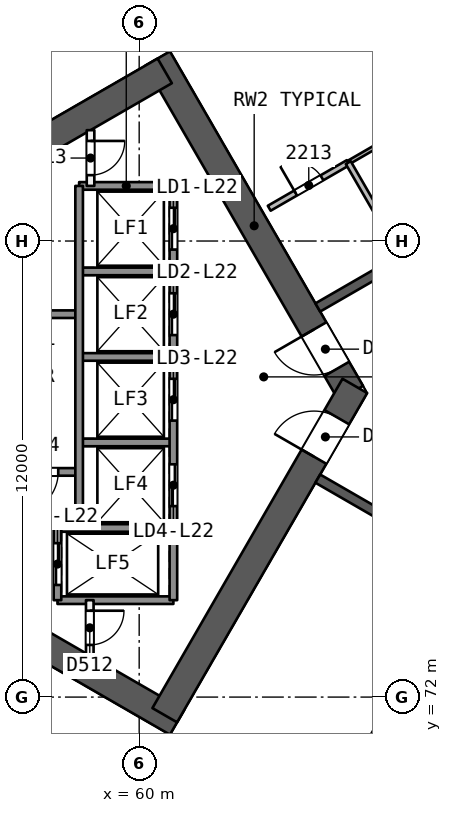
"""IFC4 building model, lengths in metres.
Left out: names, types, materials, properties, quantities, classifications, styles, units other than length and angle.
Written with IfcOpenShell. Run it as: python <this file> out.ifc"""

import sys

from ifc_helpers import new_model, si_unit, direction, frame, frame_2d, origin, place, context, subcontext, project, spatial, rectangle, extrude, element, fill, save


model = new_model("IFC4")
c1 = context("Model", 3, precision=1e-05, world=origin(), true_north=direction((0.0, 1.0)))
c2 = subcontext(c1, "Body", "Model", "MODEL_VIEW")
j1 = project(units=[si_unit("LENGTHUNIT", "METRE"), si_unit("PLANEANGLEUNIT", "RADIAN")], contexts=[c1])
p1 = place(None, origin())
s1 = spatial("IfcSite", under=j1, at=p1, CompositionType="ELEMENT")
p2 = place(p1, origin())
s2 = spatial("IfcBuilding", under=s1, at=p2, CompositionType="ELEMENT")
p3 = place(p2, frame((0.0, 0.0, 94.3)))
s3 = spatial("IfcBuildingStorey", under=s2, at=p3, CompositionType="ELEMENT", Elevation=94.3)
p4 = place(p3, frame((65.567, 80.0, 0.0), z_axis=(0.0, 0.0, 1.0), x_axis=(-0.499988615364, 0.866031976607, 0.0)))
e1 = element("IfcWall", 1, at=p4, inside=s3, PredefinedType="SHEAR", context=c2, shape_type="SweptSolid", body=[
    extrude(rectangle(XDim=10.163, YDim=0.75, at=frame_2d((5.082, 0.0))), origin(), (0.0, 0.0, 1.0), 3.7),
])
p5 = place(p4, frame((0.733, 0.0, 0.0)))
e2 = element("IfcOpeningElement", 2, at=p5, cuts=e1, PredefinedType="OPENING", context=c2, shape_type="SweptSolid", body=[
    extrude(rectangle(XDim=1.2, YDim=2.1, at=frame_2d((0.6, 1.05))), frame((0.0, 0.385, 0.0), z_axis=(0.0, -1.0, 0.0), x_axis=(1.0, 0.0, 0.0)), (0.0, 0.0, 1.0), 0.771),
])
p6 = place(p3, frame((60.673, 88.477, 0.0), z_axis=(0.0, 0.0, 1.0), x_axis=(-0.8660248072, -0.500001033313, 0.0)))
e3 = element("IfcWall", 3, at=p6, inside=s3, PredefinedType="SHEAR", context=c2, shape_type="SweptSolid", body=[
    extrude(rectangle(XDim=13.958, YDim=0.75, at=frame_2d((6.979, 0.0))), origin(), (0.0, 0.0, 1.0), 3.7),
])
p7 = place(p3, frame((48.772, 78.394, 0.0), z_axis=(0.0, 0.0, 1.0), x_axis=(0.866028339916, -0.499994914436, 0.0)))
e4 = element("IfcWall", 4, at=p7, inside=s3, PredefinedType="SHEAR", context=c2, shape_type="SweptSolid", body=[
    extrude(rectangle(XDim=14.117, YDim=0.75, at=frame_2d((7.059, 0.0))), origin(), (0.0, 0.0, 1.0), 3.7),
])
p8 = place(p3, frame((60.673, 71.523, 0.0), z_axis=(0.0, 0.0, 1.0), x_axis=(0.499997052475, 0.866027105532, 0.0)))
e5 = element("IfcWall", 5, at=p8, inside=s3, PredefinedType="SHEAR", context=c2, shape_type="SweptSolid", body=[
    extrude(rectangle(XDim=10.005, YDim=0.75, at=frame_2d((5.002, 0.0))), origin(), (0.0, 0.0, 1.0), 3.7),
])
p9 = place(p8, frame((7.855, 0.0, 0.0)))
e6 = element("IfcOpeningElement", 6, at=p9, cuts=e5, PredefinedType="OPENING", context=c2, shape_type="SweptSolid", body=[
    extrude(rectangle(XDim=1.2, YDim=2.1, at=frame_2d((0.6, 1.05))), frame((0.0, 0.385, 0.0), z_axis=(0.0, -1.0, 0.0), x_axis=(1.0, 0.0, 0.0)), (0.0, 0.0, 1.0), 0.771),
])
p10 = place(p3, frame((78.2, 90.046, 0.0), z_axis=(0.0, 0.0, 1.0), x_axis=(-0.866026492143, -0.499998114903, 0.0)))
e7 = element("IfcWall", 7, at=p10, inside=s3, PredefinedType="SHEAR", context=c2, shape_type="SweptSolid", body=[
    extrude(rectangle(XDim=15.588, YDim=0.25, at=frame_2d((7.794, 0.0))), origin(), (0.0, 0.0, 1.0), 3.25),
])
p11 = place(p10, frame((4.718, 0.0, 0.0)))
e8 = element("IfcOpeningElement", 8, at=p11, cuts=e7, PredefinedType="OPENING", context=c2, shape_type="SweptSolid", body=[
    extrude(rectangle(XDim=1.0, YDim=2.1, at=frame_2d((0.5, 1.05))), frame((0.0, 0.135, 0.0), z_axis=(0.0, -1.0, 0.0), x_axis=(1.0, 0.0, 0.0)), (0.0, 0.0, 1.0), 0.271),
])
p12 = place(p10, frame((7.194, 0.0, 0.0)))
e9 = element("IfcOpeningElement", 9, at=p12, cuts=e7, PredefinedType="OPENING", context=c2, shape_type="SweptSolid", body=[
    extrude(rectangle(XDim=1.2, YDim=2.4, at=frame_2d((0.6, 1.2))), frame((0.0, 0.135, 0.0), z_axis=(0.0, -1.0, 0.0), x_axis=(1.0, 0.0, 0.0)), (0.0, 0.0, 1.0), 0.271),
])
p13 = place(p10, frame((9.871, 0.0, 0.0)))
e10 = element("IfcOpeningElement", 10, at=p13, cuts=e7, PredefinedType="OPENING", context=c2, shape_type="SweptSolid", body=[
    extrude(rectangle(XDim=1.0, YDim=2.1, at=frame_2d((0.5, 1.05))), frame((0.0, 0.135, 0.0), z_axis=(0.0, -1.0, 0.0), x_axis=(1.0, 0.0, 0.0)), (0.0, 0.0, 1.0), 0.271),
])
p14 = place(p3, frame((64.7, 77.748, 0.0), z_axis=(0.0, 0.0, 1.0), x_axis=(0.866026492143, -0.499998114903, 0.0)))
e11 = element("IfcWall", 11, at=p14, inside=s3, PredefinedType="SHEAR", context=c2, shape_type="SweptSolid", body=[
    extrude(rectangle(XDim=15.588, YDim=0.25, at=frame_2d((7.794, 0.0))), origin(), (0.0, 0.0, 1.0), 3.25),
])
p15 = place(p14, frame((1.738, 0.0, 0.0)))
e12 = element("IfcOpeningElement", 12, at=p15, cuts=e11, PredefinedType="OPENING", context=c2, shape_type="SweptSolid", body=[
    extrude(rectangle(XDim=1.2, YDim=2.4, at=frame_2d((0.6, 1.2))), frame((0.0, 0.135, 0.0), z_axis=(0.0, -1.0, 0.0), x_axis=(1.0, 0.0, 0.0)), (0.0, 0.0, 1.0), 0.271),
])
p16 = place(p14, frame((5.785, 0.0, 0.0)))
e13 = element("IfcOpeningElement", 13, at=p16, cuts=e11, PredefinedType="OPENING", context=c2, shape_type="SweptSolid", body=[
    extrude(rectangle(XDim=0.9, YDim=2.1, at=frame_2d((0.45, 1.05))), frame((0.0, 0.135, 0.0), z_axis=(0.0, -1.0, 0.0), x_axis=(1.0, 0.0, 0.0)), (0.0, 0.0, 1.0), 0.271),
])
p17 = place(p14, frame((8.903, 0.0, 0.0)))
e14 = element("IfcOpeningElement", 14, at=p17, cuts=e11, PredefinedType="OPENING", context=c2, shape_type="SweptSolid", body=[
    extrude(rectangle(XDim=0.9, YDim=2.1, at=frame_2d((0.45, 1.05))), frame((0.0, 0.135, 0.0), z_axis=(0.0, -1.0, 0.0), x_axis=(1.0, 0.0, 0.0)), (0.0, 0.0, 1.0), 0.271),
])
p18 = place(p14, frame((12.75, 0.0, 0.0)))
e15 = element("IfcOpeningElement", 15, at=p18, cuts=e11, PredefinedType="OPENING", context=c2, shape_type="SweptSolid", body=[
    extrude(rectangle(XDim=1.0, YDim=2.1, at=frame_2d((0.5, 1.05))), frame((0.0, 0.135, 0.0), z_axis=(0.0, -1.0, 0.0), x_axis=(1.0, 0.0, 0.0)), (0.0, 0.0, 1.0), 0.271),
])
p19 = place(p3, frame((63.624, 96.587, 0.0), z_axis=(0.0, 0.0, 1.0), x_axis=(0.500006886881, -0.866021427605, 0.0)))
e16 = element("IfcWall", 16, at=p19, inside=s3, PredefinedType="PARTITIONING", context=c2, shape_type="SweptSolid", body=[
    extrude(rectangle(XDim=12.953, YDim=0.2, at=frame_2d((6.477, 0.0))), origin(), (0.0, 0.0, 1.0), 3.25),
])
p20 = place(p3, frame((63.422, 84.863, 0.0), z_axis=(0.0, 0.0, 1.0), x_axis=(0.865994240961, 0.500053971709, 0.0)))
e17 = element("IfcWall", 17, at=p20, inside=s3, PredefinedType="PARTITIONING", context=c2, shape_type="SweptSolid", body=[
    extrude(rectangle(XDim=2.401, YDim=0.15, at=frame_2d((1.201, 0.0))), origin(), (0.0, 0.0, 1.0), 3.25),
])
p21 = place(p20, frame((0.801, 0.0, 0.0)))
e18 = element("IfcOpeningElement", 18, at=p21, cuts=e17, PredefinedType="OPENING", context=c2, shape_type="SweptSolid", body=[
    extrude(rectangle(XDim=0.8, YDim=2.1, at=frame_2d((0.4, 1.05))), frame((0.0, 0.085, 0.0), z_axis=(0.0, -1.0, 0.0), x_axis=(1.0, 0.0, 0.0)), (0.0, 0.0, 1.0), 0.171),
])
p22 = place(p3, frame((65.502, 86.063, 0.0), z_axis=(0.0, 0.0, 1.0), x_axis=(0.866055983265, 0.499947031044, 0.0)))
e19 = element("IfcWall", 19, at=p22, inside=s3, PredefinedType="PARTITIONING", context=c2, shape_type="SweptSolid", body=[
    extrude(rectangle(XDim=1.6, YDim=0.1, at=frame_2d((0.8, 0.0))), origin(), (0.0, 0.0, 1.0), 3.25),
])
p23 = place(p3, frame((66.952, 83.552, 0.0), z_axis=(0.0, 0.0, 1.0), x_axis=(-0.499987231761, 0.866032775405, 0.0)))
e20 = element("IfcWall", 20, at=p23, inside=s3, PredefinedType="PARTITIONING", context=c2, shape_type="SweptSolid", body=[
    extrude(rectangle(XDim=2.9, YDim=0.15, at=frame_2d((1.45, 0.0))), origin(), (0.0, 0.0, 1.0), 3.25),
])
for number, where, z_axis, x_axis in (
    (21, (62.274, 64.193, 0.0), (0.0, 0.0, 1.0), (0.5, 0.866, 0.0)),
    (22, (64.974, 62.634, 0.0), (0.0, 0.0, 1.0), (0.5, 0.866, 0.0)),
):
    element("IfcWall", number, at=place(p3, frame(where, z_axis=z_axis, x_axis=x_axis)), inside=s3, PredefinedType="PARTITIONING", context=c2, shape_type="SweptSolid", body=[
        extrude(rectangle(XDim=12.953, YDim=0.2, at=frame_2d((6.477, 0.0))), origin(), (0.0, 0.0, 1.0), 3.25),
    ])
p24 = place(p3, frame((39.744, 82.972, 0.0), z_axis=(0.0, 0.0, 1.0), x_axis=(0.866025390357, 0.500000023256, 0.0)))
e23 = element("IfcWall", 23, at=p24, inside=s3, PredefinedType="SOLIDWALL", context=c2, shape_type="SweptSolid", body=[
    extrude(rectangle(XDim=58.093, YDim=0.3, at=frame_2d((29.046, 0.0))), origin(), (0.0, 0.0, 1.0), 3.25),
])
p25 = place(p24, frame((43.192, 0.0, 0.0)))
e24 = element("IfcOpeningElement", 24, at=p25, cuts=e23, PredefinedType="OPENING", context=c2, shape_type="SweptSolid", body=[
    extrude(rectangle(XDim=2.4, YDim=2.4, at=frame_2d((1.2, 1.2))), frame((0.0, 0.161, 0.0), z_axis=(0.0, -1.0, 0.0), x_axis=(1.0, 0.0, 0.0)), (0.0, 0.0, 1.0), 0.321),
])
p26 = place(p24, frame((12.5, 0.0, 0.0)))
e25 = element("IfcOpeningElement", 25, at=p26, cuts=e23, PredefinedType="OPENING", context=c2, shape_type="SweptSolid", body=[
    extrude(rectangle(XDim=2.4, YDim=2.4, at=frame_2d((1.2, 1.2))), frame((0.0, 0.161, 0.0), z_axis=(0.0, -1.0, 0.0), x_axis=(1.0, 0.0, 0.0)), (0.0, 0.0, 1.0), 0.321),
])
p27 = place(p24, frame((27.846, 0.0, 0.0)))
e26 = element("IfcOpeningElement", 26, at=p27, cuts=e23, PredefinedType="OPENING", context=c2, shape_type="SweptSolid", body=[
    extrude(rectangle(XDim=2.4, YDim=2.4, at=frame_2d((1.2, 1.2))), frame((0.0, 0.161, 0.0), z_axis=(0.0, -1.0, 0.0), x_axis=(1.0, 0.0, 0.0)), (0.0, 0.0, 1.0), 0.321),
])
p28 = place(p3, frame((90.054, 47.981, 0.0), z_axis=(0.0, 0.0, 1.0), x_axis=(-0.866025390357, 0.500000023256, 0.0)))
e27 = element("IfcWall", 27, at=p28, inside=s3, PredefinedType="SOLIDWALL", context=c2, shape_type="SweptSolid", body=[
    extrude(rectangle(XDim=58.093, YDim=0.3, at=frame_2d((29.046, 0.0))), origin(), (0.0, 0.0, 1.0), 3.25),
])
p29 = place(p28, frame((43.972, 0.0, 0.0)))
e28 = element("IfcOpeningElement", 28, at=p29, cuts=e27, PredefinedType="OPENING", context=c2, shape_type="SweptSolid", body=[
    extrude(rectangle(XDim=2.4, YDim=2.4, at=frame_2d((1.2, 1.2))), frame((0.0, 0.161, 0.0), z_axis=(0.0, -1.0, 0.0), x_axis=(1.0, 0.0, 0.0)), (0.0, 0.0, 1.0), 0.321),
])
p30 = place(p28, frame((22.39, 0.0, 0.0)))
e29 = element("IfcOpeningElement", 29, at=p30, cuts=e27, PredefinedType="OPENING", context=c2, shape_type="SweptSolid", body=[
    extrude(rectangle(XDim=2.4, YDim=2.4, at=frame_2d((1.2, 1.2))), frame((0.0, 0.161, 0.0), z_axis=(0.0, -1.0, 0.0), x_axis=(1.0, 0.0, 0.0)), (0.0, 0.0, 1.0), 0.321),
])
p31 = place(p28, frame((10.643, 0.0, 0.0)))
e30 = element("IfcOpeningElement", 30, at=p31, cuts=e27, PredefinedType="OPENING", context=c2, shape_type="SweptSolid", body=[
    extrude(rectangle(XDim=2.4, YDim=2.4, at=frame_2d((1.2, 1.2))), frame((0.0, 0.161, 0.0), z_axis=(0.0, -1.0, 0.0), x_axis=(1.0, 0.0, 0.0)), (0.0, 0.0, 1.0), 0.321),
])
p32 = place(p28, frame((29.705, 0.0, 0.9)))
e31 = element("IfcOpeningElement", 31, at=p32, cuts=e27, PredefinedType="OPENING", context=c2, shape_type="SweptSolid", body=[
    extrude(rectangle(XDim=1.8, YDim=1.5, at=frame_2d((0.9, 0.75))), frame((0.0, 0.161, 0.0), z_axis=(0.0, -1.0, 0.0), x_axis=(1.0, 0.0, 0.0)), (0.0, 0.0, 1.0), 0.321),
])
p33 = place(p28, frame((26.587, 0.0, 0.9)))
e32 = element("IfcOpeningElement", 32, at=p33, cuts=e27, PredefinedType="OPENING", context=c2, shape_type="SweptSolid", body=[
    extrude(rectangle(XDim=1.8, YDim=1.5, at=frame_2d((0.9, 0.75))), frame((0.0, 0.161, 0.0), z_axis=(0.0, -1.0, 0.0), x_axis=(1.0, 0.0, 0.0)), (0.0, 0.0, 1.0), 0.321),
])
for number, where, z_axis, x_axis in (
    (33, (60.9, 85.45, 0.0), (0.0, 0.0, 1.0), (-1.0, 0.0, 0.0)),
    (34, (60.9, 83.2, 0.0), (0.0, 0.0, 1.0), (-1.0, 0.0, 0.0)),
):
    element("IfcWall", number, at=place(p3, frame(where, z_axis=z_axis, x_axis=x_axis)), inside=s3, PredefinedType="SOLIDWALL", context=c2, shape_type="SweptSolid", body=[
        extrude(rectangle(XDim=2.48, YDim=0.2, at=frame_2d((1.24, 0.0))), origin(), (0.0, 0.0, 1.0), 3.25),
    ])
p34 = place(p3, frame((58.42, 82.075, 0.0), z_axis=(0.0, 0.0, 1.0), x_axis=(-1.0, 0.0, 0.0)))
e35 = element("IfcWall", 35, at=p34, inside=s3, PredefinedType="SOLIDWALL", context=c2, shape_type="SweptSolid", body=[
    extrude(rectangle(XDim=7.7, YDim=0.2, at=frame_2d((3.85, 0.0))), origin(), (0.0, 0.0, 1.0), 3.25),
])
for number, where, z_axis, x_axis in (
    (36, (60.9, 80.95, 0.0), (0.0, 0.0, 1.0), (-1.0, 0.0, 0.0)),
    (37, (60.9, 78.7, 0.0), (0.0, 0.0, 1.0), (-1.0, 0.0, 0.0)),
):
    element("IfcWall", number, at=place(p3, frame(where, z_axis=z_axis, x_axis=x_axis)), inside=s3, PredefinedType="SOLIDWALL", context=c2, shape_type="SweptSolid", body=[
        extrude(rectangle(XDim=2.48, YDim=0.2, at=frame_2d((1.24, 0.0))), origin(), (0.0, 0.0, 1.0), 3.25),
    ])
p35 = place(p3, frame((58.42, 77.925, 0.0), z_axis=(0.0, 0.0, 1.0), x_axis=(-1.0, 0.0, 0.0)))
e38 = element("IfcWall", 38, at=p35, inside=s3, PredefinedType="SOLIDWALL", context=c2, shape_type="SweptSolid", body=[
    extrude(rectangle(XDim=7.7, YDim=0.2, at=frame_2d((3.85, 0.0))), origin(), (0.0, 0.0, 1.0), 3.25),
])
p36 = place(p35, frame((0.55, 0.0, 0.0)))
e39 = element("IfcOpeningElement", 39, at=p36, cuts=e38, PredefinedType="OPENING", context=c2, shape_type="SweptSolid", body=[
    extrude(rectangle(XDim=1.1, YDim=2.1, at=frame_2d((0.55, 1.05))), frame((0.0, 0.11, 0.0), z_axis=(0.0, -1.0, 0.0), x_axis=(1.0, 0.0, 0.0)), (0.0, 0.0, 1.0), 0.221),
])
for number, where, z_axis, x_axis in (
    (40, (60.9, 76.45, 0.0), (0.0, 0.0, 1.0), (-1.0, 0.0, 0.0)),
    (41, (60.9, 74.55, 0.0), (0.0, 0.0, 1.0), (-1.0, 0.0, 0.0)),
):
    element("IfcWall", number, at=place(p3, frame(where, z_axis=z_axis, x_axis=x_axis)), inside=s3, PredefinedType="SOLIDWALL", context=c2, shape_type="SweptSolid", body=[
        extrude(rectangle(XDim=3.05, YDim=0.2, at=frame_2d((1.525, 0.0))), origin(), (0.0, 0.0, 1.0), 3.25),
    ])
p37 = place(p3, frame((60.9, 85.45, 0.0), z_axis=(0.0, 0.0, 1.0), x_axis=(0.0, -1.0, 0.0)))
e42 = element("IfcWall", 42, at=p37, inside=s3, PredefinedType="SOLIDWALL", context=c2, shape_type="SweptSolid", body=[
    extrude(rectangle(XDim=10.9, YDim=0.2, at=frame_2d((5.45, 0.0))), origin(), (0.0, 0.0, 1.0), 3.25),
])
p38 = place(p37, frame((0.575, 0.0, 0.0)))
e43 = element("IfcOpeningElement", 43, at=p38, cuts=e42, PredefinedType="OPENING", context=c2, shape_type="SweptSolid", body=[
    extrude(rectangle(XDim=1.1, YDim=2.1, at=frame_2d((0.55, 1.05))), frame((0.0, 0.11, 0.0), z_axis=(0.0, -1.0, 0.0), x_axis=(1.0, 0.0, 0.0)), (0.0, 0.0, 1.0), 0.221),
])
p39 = place(p37, frame((2.825, 0.0, 0.0)))
e44 = element("IfcOpeningElement", 44, at=p39, cuts=e42, PredefinedType="OPENING", context=c2, shape_type="SweptSolid", body=[
    extrude(rectangle(XDim=1.1, YDim=2.1, at=frame_2d((0.55, 1.05))), frame((0.0, 0.11, 0.0), z_axis=(0.0, -1.0, 0.0), x_axis=(1.0, 0.0, 0.0)), (0.0, 0.0, 1.0), 0.221),
])
p40 = place(p37, frame((5.075, 0.0, 0.0)))
e45 = element("IfcOpeningElement", 45, at=p40, cuts=e42, PredefinedType="OPENING", context=c2, shape_type="SweptSolid", body=[
    extrude(rectangle(XDim=1.1, YDim=2.1, at=frame_2d((0.55, 1.05))), frame((0.0, 0.11, 0.0), z_axis=(0.0, -1.0, 0.0), x_axis=(1.0, 0.0, 0.0)), (0.0, 0.0, 1.0), 0.221),
])
p41 = place(p37, frame((7.325, 0.0, 0.0)))
e46 = element("IfcOpeningElement", 46, at=p41, cuts=e42, PredefinedType="OPENING", context=c2, shape_type="SweptSolid", body=[
    extrude(rectangle(XDim=1.1, YDim=2.1, at=frame_2d((0.55, 1.05))), frame((0.0, 0.11, 0.0), z_axis=(0.0, -1.0, 0.0), x_axis=(1.0, 0.0, 0.0)), (0.0, 0.0, 1.0), 0.221),
])
p42 = place(p3, frame((58.72, 86.917, 0.0), z_axis=(0.0, 0.0, 1.0), x_axis=(0.0, -1.0, 0.0)))
e47 = element("IfcWall", 47, at=p42, inside=s3, PredefinedType="PARTITIONING", context=c2, shape_type="SweptSolid", body=[
    extrude(rectangle(XDim=1.467, YDim=0.2, at=frame_2d((0.733, 0.0))), origin(), (0.0, 0.0, 1.0), 3.25),
])
p43 = place(p42, frame((0.283, 0.0, 0.0)))
e48 = element("IfcOpeningElement", 48, at=p43, cuts=e47, PredefinedType="OPENING", context=c2, shape_type="SweptSolid", body=[
    extrude(rectangle(XDim=0.9, YDim=2.1, at=frame_2d((0.45, 1.05))), frame((0.0, 0.11, 0.0), z_axis=(0.0, -1.0, 0.0), x_axis=(1.0, 0.0, 0.0)), (0.0, 0.0, 1.0), 0.221),
])
p44 = place(p3, frame((58.7, 74.55, 0.0), z_axis=(0.0, 0.0, 1.0), x_axis=(0.0, -1.0, 0.0)))
e49 = element("IfcWall", 49, at=p44, inside=s3, PredefinedType="PARTITIONING", context=c2, shape_type="SweptSolid", body=[
    extrude(rectangle(XDim=1.455, YDim=0.2, at=frame_2d((0.728, 0.0))), origin(), (0.0, 0.0, 1.0), 3.25),
])
p45 = place(p44, frame((0.278, 0.0, 0.0)))
e50 = element("IfcOpeningElement", 50, at=p45, cuts=e49, PredefinedType="OPENING", context=c2, shape_type="SweptSolid", body=[
    extrude(rectangle(XDim=0.9, YDim=2.1, at=frame_2d((0.45, 1.05))), frame((0.0, 0.11, 0.0), z_axis=(0.0, -1.0, 0.0), x_axis=(1.0, 0.0, 0.0)), (0.0, 0.0, 1.0), 0.221),
])
p46 = place(p3, frame((58.42, 85.45, 0.0), z_axis=(0.0, 0.0, 1.0), x_axis=(0.0, -1.0, 0.0)))
e51 = element("IfcWall", 51, at=p46, inside=s3, PredefinedType="SOLIDWALL", context=c2, shape_type="SweptSolid", body=[
    extrude(rectangle(XDim=9.0, YDim=0.2, at=frame_2d((4.5, 0.0))), origin(), (0.0, 0.0, 1.0), 3.25),
])
p47 = place(p3, frame((57.85, 76.45, 0.0), z_axis=(0.0, 0.0, 1.0), x_axis=(0.0, -1.0, 0.0)))
e52 = element("IfcWall", 52, at=p47, inside=s3, PredefinedType="SOLIDWALL", context=c2, shape_type="SweptSolid", body=[
    extrude(rectangle(XDim=1.9, YDim=0.2, at=frame_2d((0.95, 0.0))), origin(), (0.0, 0.0, 1.0), 3.25),
])
p48 = place(p47, frame((0.4, 0.0, 0.0)))
e53 = element("IfcOpeningElement", 53, at=p48, cuts=e52, PredefinedType="OPENING", context=c2, shape_type="SweptSolid", body=[
    extrude(rectangle(XDim=1.1, YDim=2.1, at=frame_2d((0.55, 1.05))), frame((0.0, 0.11, 0.0), z_axis=(0.0, -1.0, 0.0), x_axis=(1.0, 0.0, 0.0)), (0.0, 0.0, 1.0), 0.221),
])
p49 = place(p21, origin())
e54 = element("IfcDoor", 54, at=p49, inside=s3, OperationType="SINGLE_SWING_LEFT", PredefinedType="NOTDEFINED", context=c2, shape_type="SweptSolid", body=[
    extrude(rectangle(XDim=0.8, YDim=2.1, at=frame_2d((0.4, 1.05))), frame((0.0, 0.025, 0.0), z_axis=(0.0, -1.0, 0.0), x_axis=(1.0, 0.0, 0.0)), (0.0, 0.0, 1.0), 0.05),
])
fill(e18, e54)
p50 = place(p5, origin())
e55 = element("IfcDoor", 55, at=p50, inside=s3, OperationType="SINGLE_SWING_RIGHT", PredefinedType="NOTDEFINED", context=c2, shape_type="SweptSolid", body=[
    extrude(rectangle(XDim=1.2, YDim=2.1, at=frame_2d((0.6, 1.05))), frame((0.0, 0.025, 0.0), z_axis=(0.0, -1.0, 0.0), x_axis=(1.0, 0.0, 0.0)), (0.0, 0.0, 1.0), 0.05),
])
fill(e2, e55)
p51 = place(p9, origin())
e56 = element("IfcDoor", 56, at=p51, inside=s3, OperationType="SINGLE_SWING_LEFT", PredefinedType="NOTDEFINED", context=c2, shape_type="SweptSolid", body=[
    extrude(rectangle(XDim=1.2, YDim=2.1, at=frame_2d((0.6, 1.05))), frame((0.0, 0.025, 0.0), z_axis=(0.0, -1.0, 0.0), x_axis=(1.0, 0.0, 0.0)), (0.0, 0.0, 1.0), 0.05),
])
fill(e6, e56)
p52 = place(p38, origin())
e57 = element("IfcDoor", 57, at=p52, inside=s3, OperationType="SLIDING_TO_RIGHT", PredefinedType="NOTDEFINED", context=c2, shape_type="SweptSolid", body=[
    extrude(rectangle(XDim=1.1, YDim=2.1, at=frame_2d((0.55, 1.05))), frame((0.0, 0.025, 0.0), z_axis=(0.0, -1.0, 0.0), x_axis=(1.0, 0.0, 0.0)), (0.0, 0.0, 1.0), 0.05),
])
fill(e43, e57)
p53 = place(p39, origin())
e58 = element("IfcDoor", 58, at=p53, inside=s3, OperationType="SLIDING_TO_LEFT", PredefinedType="NOTDEFINED", context=c2, shape_type="SweptSolid", body=[
    extrude(rectangle(XDim=1.1, YDim=2.1, at=frame_2d((0.55, 1.05))), frame((0.0, 0.025, 0.0), z_axis=(0.0, -1.0, 0.0), x_axis=(1.0, 0.0, 0.0)), (0.0, 0.0, 1.0), 0.05),
])
fill(e44, e58)
p54 = place(p40, origin())
e59 = element("IfcDoor", 59, at=p54, inside=s3, OperationType="SLIDING_TO_RIGHT", PredefinedType="NOTDEFINED", context=c2, shape_type="SweptSolid", body=[
    extrude(rectangle(XDim=1.1, YDim=2.1, at=frame_2d((0.55, 1.05))), frame((0.0, 0.025, 0.0), z_axis=(0.0, -1.0, 0.0), x_axis=(1.0, 0.0, 0.0)), (0.0, 0.0, 1.0), 0.05),
])
fill(e45, e59)
p55 = place(p41, origin())
e60 = element("IfcDoor", 60, at=p55, inside=s3, OperationType="SLIDING_TO_LEFT", PredefinedType="NOTDEFINED", context=c2, shape_type="SweptSolid", body=[
    extrude(rectangle(XDim=1.1, YDim=2.1, at=frame_2d((0.55, 1.05))), frame((0.0, 0.025, 0.0), z_axis=(0.0, -1.0, 0.0), x_axis=(1.0, 0.0, 0.0)), (0.0, 0.0, 1.0), 0.05),
])
fill(e46, e60)
p56 = place(p48, origin())
e61 = element("IfcDoor", 61, at=p56, inside=s3, OperationType="SLIDING_TO_RIGHT", PredefinedType="NOTDEFINED", context=c2, shape_type="SweptSolid", body=[
    extrude(rectangle(XDim=1.1, YDim=2.1, at=frame_2d((0.55, 1.05))), frame((0.0, 0.025, 0.0), z_axis=(0.0, -1.0, 0.0), x_axis=(1.0, 0.0, 0.0)), (0.0, 0.0, 1.0), 0.05),
])
fill(e53, e61)
p57 = place(p45, origin())
e62 = element("IfcDoor", 62, at=p57, inside=s3, OperationType="SINGLE_SWING_LEFT", PredefinedType="NOTDEFINED", context=c2, shape_type="SweptSolid", body=[
    extrude(rectangle(XDim=0.9, YDim=2.1, at=frame_2d((0.45, 1.05))), frame((0.0, 0.025, 0.0), z_axis=(0.0, -1.0, 0.0), x_axis=(1.0, 0.0, 0.0)), (0.0, 0.0, 1.0), 0.05),
])
fill(e50, e62)
p58 = place(p43, origin())
e63 = element("IfcDoor", 63, at=p58, inside=s3, OperationType="SINGLE_SWING_LEFT", PredefinedType="NOTDEFINED", context=c2, shape_type="SweptSolid", body=[
    extrude(rectangle(XDim=0.9, YDim=2.1, at=frame_2d((0.45, 1.05))), frame((0.0, 0.025, 0.0), z_axis=(0.0, -1.0, 0.0), x_axis=(1.0, 0.0, 0.0)), (0.0, 0.0, 1.0), 0.05),
])
fill(e48, e63)
p59 = place(p36, origin())
e64 = element("IfcDoor", 64, at=p59, inside=s3, OperationType="SINGLE_SWING_RIGHT", PredefinedType="NOTDEFINED", context=c2, shape_type="SweptSolid", body=[
    extrude(rectangle(XDim=1.1, YDim=2.1, at=frame_2d((0.55, 1.05))), frame((0.0, 0.025, 0.0), z_axis=(0.0, -1.0, 0.0), x_axis=(1.0, 0.0, 0.0)), (0.0, 0.0, 1.0), 0.05),
])
fill(e39, e64)
save(model, sys.argv[1])
